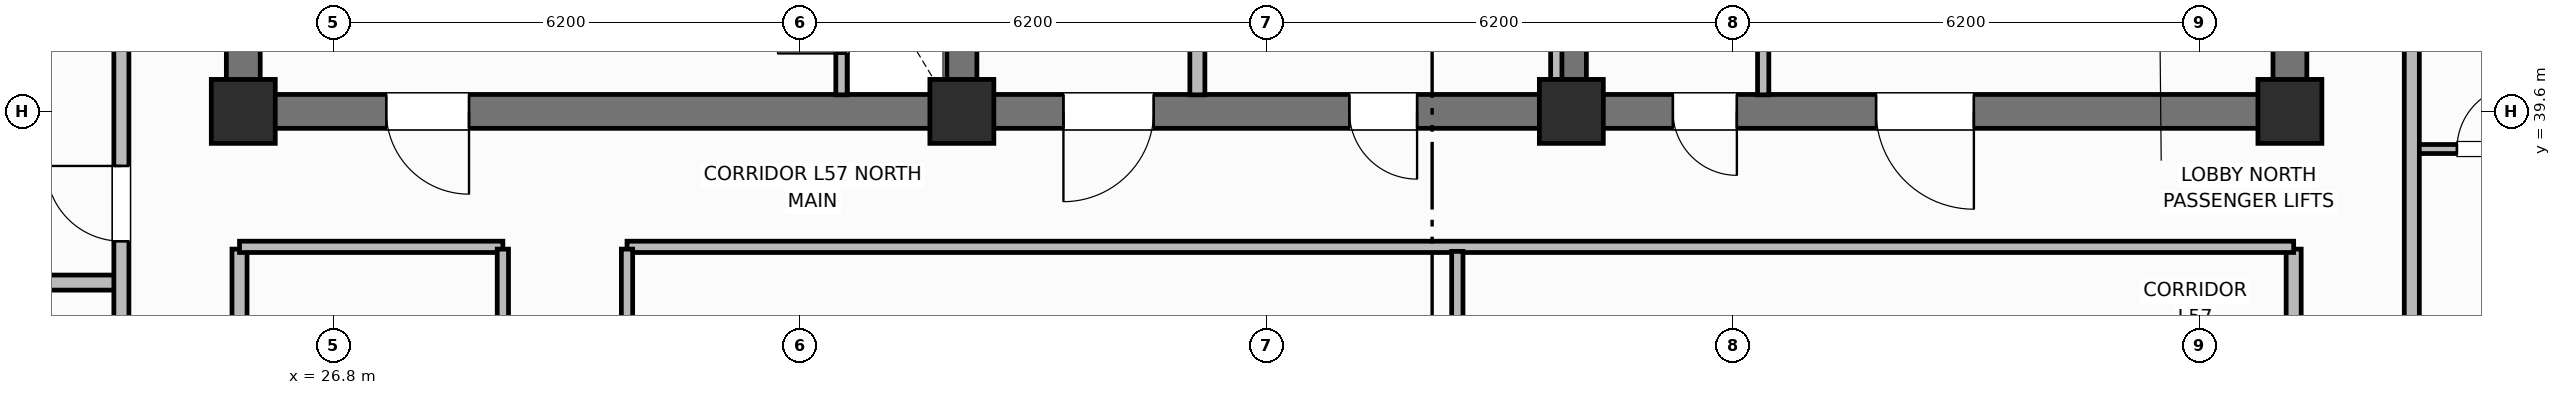
"""IFC4 building model, lengths in metres.
Left out: names, types, materials, properties, quantities, classifications, styles, units other than length and angle.
Written with IfcOpenShell. Run it as: python <this file> out.ifc"""

import sys

from ifc_helpers import new_model, si_unit, direction, frame, frame_2d, origin, origin_2d, place, context, subcontext, project, spatial, rectangle, extrude, element, fill, save


model = new_model("IFC4")
c1 = context("Model", 3, precision=1e-05, world=origin(), true_north=direction((0.0, 1.0)))
c2 = subcontext(c1, "Body", "Model", "MODEL_VIEW")
j1 = project(units=[si_unit("LENGTHUNIT", "METRE"), si_unit("PLANEANGLEUNIT", "RADIAN")], contexts=[c1])
p1 = place(None, origin())
s1 = spatial("IfcSite", under=j1, at=p1, CompositionType="ELEMENT")
p2 = place(p1, origin())
s2 = spatial("IfcBuilding", under=s1, at=p2, CompositionType="ELEMENT")
p3 = place(p2, frame((0.0, 0.0, 229.5)))
s3 = spatial("IfcBuildingStorey", under=s2, at=p3, CompositionType="ELEMENT", Elevation=229.5)
for number, where, z_axis, x_axis in (
    (1, (25.6, 39.825, 0.0), (0.0, 0.0, 1.0), (0.0, 1.0, 0.0)),
    (2, (52.8, 39.825, 0.0), (0.0, 0.0, 1.0), (0.0, 1.0, 0.0)),
):
    element("IfcWall", number, at=place(p3, frame(where, z_axis=z_axis, x_axis=x_axis)), inside=s3, PredefinedType="SHEAR", context=c2, shape_type="SweptSolid", body=[
        extrude(rectangle(XDim=5.75, YDim=0.45, at=frame_2d((2.875, 0.0))), origin(), (0.0, 0.0, 1.0), 3.7),
    ])
p4 = place(p3, frame((52.8, 39.6, 0.0), z_axis=(0.0, 0.0, 1.0), x_axis=(-1.0, 0.0, 0.0)))
e3 = element("IfcWall", 3, at=p4, inside=s3, PredefinedType="SHEAR", context=c2, shape_type="SweptSolid", body=[
    extrude(rectangle(XDim=27.2, YDim=0.45, at=frame_2d((13.6, 0.0))), origin(), (0.0, 0.0, 1.0), 3.7),
])
p5 = place(p4, frame((24.2, 0.0, 0.0)))
e4 = element("IfcOpeningElement", 4, at=p5, cuts=e3, PredefinedType="OPENING", context=c2, shape_type="SweptSolid", body=[
    extrude(rectangle(XDim=1.1, YDim=2.15, at=frame_2d((0.55, 1.075))), frame((0.0, 0.235, 0.0), z_axis=(0.0, -1.0, 0.0), x_axis=(1.0, 0.0, 0.0)), (0.0, 0.0, 1.0), 0.47),
])
p6 = place(p4, frame((15.1, 0.0, 0.0)))
e5 = element("IfcOpeningElement", 5, at=p6, cuts=e3, PredefinedType="OPENING", context=c2, shape_type="SweptSolid", body=[
    extrude(rectangle(XDim=1.2, YDim=2.15, at=frame_2d((0.6, 1.075))), frame((0.0, 0.235, 0.0), z_axis=(0.0, -1.0, 0.0), x_axis=(1.0, 0.0, 0.0)), (0.0, 0.0, 1.0), 0.47),
])
p7 = place(p4, frame((11.6, 0.0, 0.0)))
e6 = element("IfcOpeningElement", 6, at=p7, cuts=e3, PredefinedType="OPENING", context=c2, shape_type="SweptSolid", body=[
    extrude(rectangle(XDim=0.9, YDim=2.1, at=frame_2d((0.45, 1.05))), frame((0.0, 0.235, 0.0), z_axis=(0.0, -1.0, 0.0), x_axis=(1.0, 0.0, 0.0)), (0.0, 0.0, 1.0), 0.47),
])
p8 = place(p4, frame((7.35, 0.0, 0.0)))
e7 = element("IfcOpeningElement", 7, at=p8, cuts=e3, PredefinedType="OPENING", context=c2, shape_type="SweptSolid", body=[
    extrude(rectangle(XDim=0.85, YDim=2.1, at=frame_2d((0.425, 1.05))), frame((0.0, 0.235, 0.0), z_axis=(0.0, -1.0, 0.0), x_axis=(1.0, 0.0, 0.0)), (0.0, 0.0, 1.0), 0.47),
])
p9 = place(p4, frame((4.2, 0.0, 0.0)))
e8 = element("IfcOpeningElement", 8, at=p9, cuts=e3, PredefinedType="OPENING", context=c2, shape_type="SweptSolid", body=[
    extrude(rectangle(XDim=1.3, YDim=2.2, at=frame_2d((0.65, 1.1))), frame((0.0, 0.235, 0.0), z_axis=(0.0, -1.0, 0.0), x_axis=(1.0, 0.0, 0.0)), (0.0, 0.0, 1.0), 0.47),
])
for number, where, z_axis, x_axis in (
    (9, (35.15, 39.825, 0.0), (0.0, 0.0, 1.0), (0.0, 1.0, 0.0)),
    (10, (43.25, 39.825, 0.0), (0.0, 0.0, 1.0), (0.0, 1.0, 0.0)),
):
    element("IfcWall", number, at=place(p3, frame(where, z_axis=z_axis, x_axis=x_axis)), inside=s3, PredefinedType="SHEAR", context=c2, shape_type="SweptSolid", body=[
        extrude(rectangle(XDim=5.75, YDim=0.4, at=frame_2d((2.875, 0.0))), origin(), (0.0, 0.0, 1.0), 3.7),
    ])
for number, where, z_axis, x_axis in (
    (11, (25.6, 39.6, 0.0), (0.0, 0.0, 1.0), (1.0, 0.0, 0.0)),
    (12, (35.15, 39.6, 0.0), (0.0, 0.0, 1.0), (1.0, 0.0, 0.0)),
    (13, (43.25, 39.6, 0.0), (0.0, 0.0, 1.0), (1.0, 0.0, 0.0)),
    (14, (52.8, 39.6, 0.0), (0.0, 0.0, 1.0), (1.0, 0.0, 0.0)),
):
    element("IfcColumn", number, at=place(p3, frame(where, z_axis=z_axis, x_axis=x_axis)), inside=s3, PredefinedType="COLUMN", context=c2, shape_type="SweptSolid", body=[
        extrude(rectangle(XDim=0.85, YDim=0.85, at=origin_2d()), origin(), (0.0, 0.0, 1.0), 3.7),
    ])
p10 = place(p3, frame((33.55, 39.82, 0.0), z_axis=(0.0, 0.0, 1.0), x_axis=(0.0, 1.0, 0.0)))
e15 = element("IfcWall", 15, at=p10, inside=s3, PredefinedType="PARTITIONING", context=c2, shape_type="SweptSolid", body=[
    extrude(rectangle(XDim=2.13, YDim=0.15, at=frame_2d((1.065, 0.0))), origin(), (0.0, 0.0, 1.0), 2.56),
])
p11 = place(p10, frame((0.55, 0.0, 0.0)))
e16 = element("IfcOpeningElement", 16, at=p11, cuts=e15, PredefinedType="OPENING", context=c2, shape_type="SweptSolid", body=[
    extrude(rectangle(XDim=0.85, YDim=2.05, at=frame_2d((0.425, 1.025))), frame((0.0, 0.085, 0.0), z_axis=(0.0, -1.0, 0.0), x_axis=(1.0, 0.0, 0.0)), (0.0, 0.0, 1.0), 0.17),
])
p12 = place(p3, frame((38.28, 39.82, 0.0), z_axis=(0.0, 0.0, 1.0), x_axis=(0.0, 1.0, 0.0)))
e17 = element("IfcWall", 17, at=p12, inside=s3, PredefinedType="PARTITIONING", context=c2, shape_type="SweptSolid", body=[
    extrude(rectangle(XDim=5.63, YDim=0.2, at=frame_2d((2.815, 0.0))), origin(), (0.0, 0.0, 1.0), 2.56),
])
for number, where, z_axis, x_axis in (
    (18, (43.05, 39.82, 0.0), (0.0, 0.0, 1.0), (0.0, 1.0, 0.0)),
    (19, (45.8, 39.82, 0.0), (0.0, 0.0, 1.0), (0.0, 1.0, 0.0)),
):
    element("IfcWall", number, at=place(p3, frame(where, z_axis=z_axis, x_axis=x_axis)), inside=s3, PredefinedType="PARTITIONING", context=c2, shape_type="SweptSolid", body=[
        extrude(rectangle(XDim=5.63, YDim=0.15, at=frame_2d((2.815, 0.0))), origin(), (0.0, 0.0, 1.0), 2.56),
    ])
for number, where, z_axis, x_axis in (
    (20, (25.55, 18.63, 0.0), (0.0, 0.0, 1.0), (0.0, 1.0, 0.0)),
    (21, (52.85, 18.63, 0.0), (0.0, 0.0, 1.0), (0.0, 1.0, 0.0)),
):
    element("IfcWall", number, at=place(p3, frame(where, z_axis=z_axis, x_axis=x_axis)), inside=s3, PredefinedType="PARTITIONING", context=c2, shape_type="SweptSolid", body=[
        extrude(rectangle(XDim=19.14, YDim=0.2, at=frame_2d((9.57, 0.0))), origin(), (0.0, 0.0, 1.0), 2.56),
    ])
p13 = place(p3, frame((25.55, 37.8, 0.0), z_axis=(0.0, 0.0, 1.0), x_axis=(1.0, 0.0, 0.0)))
e22 = element("IfcWall", 22, at=p13, inside=s3, PredefinedType="PARTITIONING", context=c2, shape_type="SweptSolid", body=[
    extrude(rectangle(XDim=3.5, YDim=0.15, at=frame_2d((1.75, 0.0))), origin(), (0.0, 0.0, 1.0), 2.56),
])
p14 = place(p3, frame((30.7, 37.8, 0.0), z_axis=(0.0, 0.0, 1.0), x_axis=(1.0, 0.0, 0.0)))
e23 = element("IfcWall", 23, at=p14, inside=s3, PredefinedType="PARTITIONING", context=c2, shape_type="SweptSolid", body=[
    extrude(rectangle(XDim=22.15, YDim=0.15, at=frame_2d((11.075, 0.0))), origin(), (0.0, 0.0, 1.0), 2.56),
])
p15 = place(p3, frame((41.735, 18.66, 0.0), z_axis=(0.0, 0.0, 1.0), x_axis=(0.0, 1.0, 0.0)))
e24 = element("IfcWall", 24, at=p15, inside=s3, PredefinedType="PARTITIONING", context=c2, shape_type="SweptSolid", body=[
    extrude(rectangle(XDim=19.08, YDim=0.15, at=frame_2d((9.54, 0.0))), origin(), (0.0, 0.0, 1.0), 2.56),
])
p16 = place(p15, frame((6.5, 0.0, 0.0)))
e25 = element("IfcOpeningElement", 25, at=p16, cuts=e24, PredefinedType="OPENING", context=c2, shape_type="SweptSolid", body=[
    extrude(rectangle(XDim=1.0, YDim=2.15, at=frame_2d((0.5, 1.075))), frame((0.0, 0.085, 0.0), z_axis=(0.0, -1.0, 0.0), x_axis=(1.0, 0.0, 0.0)), (0.0, 0.0, 1.0), 0.17),
])
p17 = place(p3, frame((29.05, 18.63, 0.0), z_axis=(0.0, 0.0, 1.0), x_axis=(0.0, 1.0, 0.0)))
e26 = element("IfcWall", 26, at=p17, inside=s3, PredefinedType="PARTITIONING", context=c2, shape_type="SweptSolid", body=[
    extrude(rectangle(XDim=19.14, YDim=0.15, at=frame_2d((9.57, 0.0))), origin(), (0.0, 0.0, 1.0), 2.56),
])
p18 = place(p17, frame((5.5, 0.0, 0.0)))
e27 = element("IfcOpeningElement", 27, at=p18, cuts=e26, PredefinedType="OPENING", context=c2, shape_type="SweptSolid", body=[
    extrude(rectangle(XDim=1.0, YDim=2.15, at=frame_2d((0.5, 1.075))), frame((0.0, 0.085, 0.0), z_axis=(0.0, -1.0, 0.0), x_axis=(1.0, 0.0, 0.0)), (0.0, 0.0, 1.0), 0.17),
])
p19 = place(p3, frame((30.7, 18.63, 0.0), z_axis=(0.0, 0.0, 1.0), x_axis=(0.0, 1.0, 0.0)))
e28 = element("IfcWall", 28, at=p19, inside=s3, PredefinedType="PARTITIONING", context=c2, shape_type="SweptSolid", body=[
    extrude(rectangle(XDim=19.14, YDim=0.15, at=frame_2d((9.57, 0.0))), origin(), (0.0, 0.0, 1.0), 2.56),
])
p20 = place(p19, frame((5.5, 0.0, 0.0)))
e29 = element("IfcOpeningElement", 29, at=p20, cuts=e28, PredefinedType="OPENING", context=c2, shape_type="SweptSolid", body=[
    extrude(rectangle(XDim=1.0, YDim=2.15, at=frame_2d((0.5, 1.075))), frame((0.0, 0.085, 0.0), z_axis=(0.0, -1.0, 0.0), x_axis=(1.0, 0.0, 0.0)), (0.0, 0.0, 1.0), 0.17),
])
p21 = place(p3, frame((19.53, 37.325, 0.0), z_axis=(0.0, 0.0, 1.0), x_axis=(1.0, 0.0, 0.0)))
e30 = element("IfcWall", 30, at=p21, inside=s3, PredefinedType="PARTITIONING", context=c2, shape_type="SweptSolid", body=[
    extrude(rectangle(XDim=4.45, YDim=0.2, at=frame_2d((2.225, 0.0))), origin(), (0.0, 0.0, 1.0), 2.56),
])
p22 = place(p3, frame((23.98, 9.95, 0.0), z_axis=(0.0, 0.0, 1.0), x_axis=(0.0, 1.0, 0.0)))
e31 = element("IfcWall", 31, at=p22, inside=s3, PredefinedType="PARTITIONING", context=c2, shape_type="SweptSolid", body=[
    extrude(rectangle(XDim=36.5, YDim=0.2, at=frame_2d((18.25, 0.0))), origin(), (0.0, 0.0, 1.0), 2.56),
])
p23 = place(p22, frame((2.93, 0.0, 0.0)))
e32 = element("IfcOpeningElement", 32, at=p23, cuts=e31, PredefinedType="OPENING", context=c2, shape_type="SweptSolid", body=[
    extrude(rectangle(XDim=1.0, YDim=2.15, at=frame_2d((0.5, 1.075))), frame((0.0, 0.11, 0.0), z_axis=(0.0, -1.0, 0.0), x_axis=(1.0, 0.0, 0.0)), (0.0, 0.0, 1.0), 0.22),
])
p24 = place(p22, frame((10.525, 0.0, 0.0)))
e33 = element("IfcOpeningElement", 33, at=p24, cuts=e31, PredefinedType="OPENING", context=c2, shape_type="SweptSolid", body=[
    extrude(rectangle(XDim=1.0, YDim=2.15, at=frame_2d((0.5, 1.075))), frame((0.0, 0.11, 0.0), z_axis=(0.0, -1.0, 0.0), x_axis=(1.0, 0.0, 0.0)), (0.0, 0.0, 1.0), 0.22),
])
p25 = place(p22, frame((15.175, 0.0, 0.0)))
e34 = element("IfcOpeningElement", 34, at=p25, cuts=e31, PredefinedType="OPENING", context=c2, shape_type="SweptSolid", body=[
    extrude(rectangle(XDim=1.0, YDim=2.15, at=frame_2d((0.5, 1.075))), frame((0.0, 0.11, 0.0), z_axis=(0.0, -1.0, 0.0), x_axis=(1.0, 0.0, 0.0)), (0.0, 0.0, 1.0), 0.22),
])
p26 = place(p22, frame((27.925, 0.0, 0.0)))
e35 = element("IfcOpeningElement", 35, at=p26, cuts=e31, PredefinedType="OPENING", context=c2, shape_type="SweptSolid", body=[
    extrude(rectangle(XDim=1.0, YDim=2.15, at=frame_2d((0.5, 1.075))), frame((0.0, 0.11, 0.0), z_axis=(0.0, -1.0, 0.0), x_axis=(1.0, 0.0, 0.0)), (0.0, 0.0, 1.0), 0.22),
])
p27 = place(p3, frame((54.42, 39.1, 0.0), z_axis=(0.0, 0.0, 1.0), x_axis=(1.0, 0.0, 0.0)))
e36 = element("IfcWall", 36, at=p27, inside=s3, PredefinedType="PARTITIONING", context=c2, shape_type="SweptSolid", body=[
    extrude(rectangle(XDim=1.95, YDim=0.12, at=frame_2d((0.975, 0.0))), origin(), (0.0, 0.0, 1.0), 2.56),
])
p28 = place(p27, frame((0.6, 0.0, 0.0)))
e37 = element("IfcOpeningElement", 37, at=p28, cuts=e36, PredefinedType="OPENING", context=c2, shape_type="SweptSolid", body=[
    extrude(rectangle(XDim=0.85, YDim=2.1, at=frame_2d((0.425, 1.05))), frame((0.0, 0.07, 0.0), z_axis=(0.0, -1.0, 0.0), x_axis=(1.0, 0.0, 0.0)), (0.0, 0.0, 1.0), 0.14),
])
p29 = place(p3, frame((54.42, 9.95, 0.0), z_axis=(0.0, 0.0, 1.0), x_axis=(0.0, 1.0, 0.0)))
e38 = element("IfcWall", 38, at=p29, inside=s3, PredefinedType="PARTITIONING", context=c2, shape_type="SweptSolid", body=[
    extrude(rectangle(XDim=36.5, YDim=0.2, at=frame_2d((18.25, 0.0))), origin(), (0.0, 0.0, 1.0), 2.56),
])
p30 = place(p29, frame((3.25, 0.0, 0.0)))
e39 = element("IfcOpeningElement", 39, at=p30, cuts=e38, PredefinedType="OPENING", context=c2, shape_type="SweptSolid", body=[
    extrude(rectangle(XDim=1.0, YDim=2.15, at=frame_2d((0.5, 1.075))), frame((0.0, 0.11, 0.0), z_axis=(0.0, -1.0, 0.0), x_axis=(1.0, 0.0, 0.0)), (0.0, 0.0, 1.0), 0.22),
])
p31 = place(p29, frame((12.96, 0.0, 0.0)))
e40 = element("IfcOpeningElement", 40, at=p31, cuts=e38, PredefinedType="OPENING", context=c2, shape_type="SweptSolid", body=[
    extrude(rectangle(XDim=1.0, YDim=2.15, at=frame_2d((0.5, 1.075))), frame((0.0, 0.11, 0.0), z_axis=(0.0, -1.0, 0.0), x_axis=(1.0, 0.0, 0.0)), (0.0, 0.0, 1.0), 0.22),
])
p32 = place(p29, frame((24.3, 0.0, 0.0)))
e41 = element("IfcOpeningElement", 41, at=p32, cuts=e38, PredefinedType="OPENING", context=c2, shape_type="SweptSolid", body=[
    extrude(rectangle(XDim=1.0, YDim=2.15, at=frame_2d((0.5, 1.075))), frame((0.0, 0.11, 0.0), z_axis=(0.0, -1.0, 0.0), x_axis=(1.0, 0.0, 0.0)), (0.0, 0.0, 1.0), 0.22),
])
p33 = place(p11, origin())
e42 = element("IfcDoor", 42, at=p33, inside=s3, OperationType="SINGLE_SWING_LEFT", PredefinedType="TRAPDOOR", context=c2, shape_type="SweptSolid", body=[
    extrude(rectangle(XDim=0.85, YDim=2.05, at=frame_2d((0.425, 1.025))), frame((0.0, 0.025, 0.0), z_axis=(0.0, -1.0, 0.0), x_axis=(1.0, 0.0, 0.0)), (0.0, 0.0, 1.0), 0.05),
])
fill(e16, e42)
p34 = place(p26, origin())
e43 = element("IfcDoor", 43, at=p34, inside=s3, OperationType="SINGLE_SWING_RIGHT", PredefinedType="DOOR", context=c2, shape_type="SweptSolid", body=[
    extrude(rectangle(XDim=1.0, YDim=2.15, at=frame_2d((0.5, 1.075))), frame((0.0, 0.025, 0.0), z_axis=(0.0, -1.0, 0.0), x_axis=(1.0, 0.0, 0.0)), (0.0, 0.0, 1.0), 0.05),
])
fill(e35, e43)
p35 = place(p28, origin())
e44 = element("IfcDoor", 44, at=p35, inside=s3, OperationType="SINGLE_SWING_RIGHT", PredefinedType="DOOR", context=c2, shape_type="SweptSolid", body=[
    extrude(rectangle(XDim=0.85, YDim=2.1, at=frame_2d((0.425, 1.05))), frame((0.0, 0.025, 0.0), z_axis=(0.0, -1.0, 0.0), x_axis=(1.0, 0.0, 0.0)), (0.0, 0.0, 1.0), 0.05),
])
fill(e37, e44)
p36 = place(p5, origin())
e45 = element("IfcDoor", 45, at=p36, inside=s3, OperationType="SINGLE_SWING_LEFT", PredefinedType="DOOR", context=c2, shape_type="SweptSolid", body=[
    extrude(rectangle(XDim=1.1, YDim=2.15, at=frame_2d((0.55, 1.075))), frame((0.0, 0.025, 0.0), z_axis=(0.0, -1.0, 0.0), x_axis=(1.0, 0.0, 0.0)), (0.0, 0.0, 1.0), 0.05),
])
fill(e4, e45)
p37 = place(p6, origin())
e46 = element("IfcDoor", 46, at=p37, inside=s3, OperationType="SINGLE_SWING_RIGHT", PredefinedType="DOOR", context=c2, shape_type="SweptSolid", body=[
    extrude(rectangle(XDim=1.2, YDim=2.15, at=frame_2d((0.6, 1.075))), frame((0.0, 0.025, 0.0), z_axis=(0.0, -1.0, 0.0), x_axis=(1.0, 0.0, 0.0)), (0.0, 0.0, 1.0), 0.05),
])
fill(e5, e46)
p38 = place(p7, origin())
e47 = element("IfcDoor", 47, at=p38, inside=s3, OperationType="SINGLE_SWING_LEFT", PredefinedType="DOOR", context=c2, shape_type="SweptSolid", body=[
    extrude(rectangle(XDim=0.9, YDim=2.1, at=frame_2d((0.45, 1.05))), frame((0.0, 0.025, 0.0), z_axis=(0.0, -1.0, 0.0), x_axis=(1.0, 0.0, 0.0)), (0.0, 0.0, 1.0), 0.05),
])
fill(e6, e47)
p39 = place(p8, origin())
e48 = element("IfcDoor", 48, at=p39, inside=s3, OperationType="SINGLE_SWING_LEFT", PredefinedType="DOOR", context=c2, shape_type="SweptSolid", body=[
    extrude(rectangle(XDim=0.85, YDim=2.1, at=frame_2d((0.425, 1.05))), frame((0.0, 0.025, 0.0), z_axis=(0.0, -1.0, 0.0), x_axis=(1.0, 0.0, 0.0)), (0.0, 0.0, 1.0), 0.05),
])
fill(e7, e48)
p40 = place(p9, origin())
e49 = element("IfcDoor", 49, at=p40, inside=s3, OperationType="SINGLE_SWING_LEFT", PredefinedType="DOOR", context=c2, shape_type="SweptSolid", body=[
    extrude(rectangle(XDim=1.3, YDim=2.2, at=frame_2d((0.65, 1.1))), frame((0.0, 0.025, 0.0), z_axis=(0.0, -1.0, 0.0), x_axis=(1.0, 0.0, 0.0)), (0.0, 0.0, 1.0), 0.05),
])
fill(e8, e49)
save(model, sys.argv[1])
